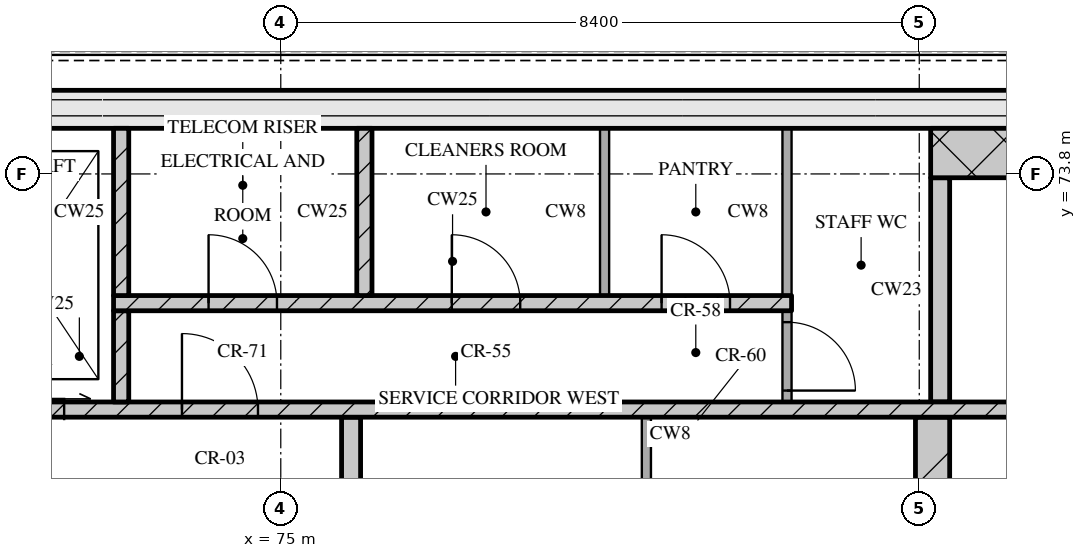
"""IFC4 building model, lengths in metres.
Left out: names, types, materials, properties, quantities, classifications, styles, units other than length and angle.
Written with IfcOpenShell. Run it as: python <this file> out.ifc"""

import sys

from ifc_helpers import new_model, si_unit, direction, frame, frame_2d, origin, place, context, subcontext, project, spatial, rectangle, extrude, element, fill, save


model = new_model("IFC4")
c1 = context("Model", 3, precision=1e-05, world=origin(), true_north=direction((0.0, 1.0)))
c2 = subcontext(c1, "Body", "Model", "MODEL_VIEW")
j1 = project(units=[si_unit("LENGTHUNIT", "METRE"), si_unit("PLANEANGLEUNIT", "RADIAN")], contexts=[c1])
p1 = place(None, origin())
s1 = spatial("IfcSite", under=j1, at=p1, CompositionType="ELEMENT")
p2 = place(p1, origin())
s2 = spatial("IfcBuilding", under=s1, at=p2, CompositionType="ELEMENT")
p3 = place(p2, frame((0.0, 0.0, 267.15)))
s3 = spatial("IfcBuildingStorey", under=s2, at=p3, CompositionType="ELEMENT", Elevation=267.15)
p4 = place(p3, frame((67.3, 74.65, 0.0), z_axis=(0.0, 0.0, 1.0), x_axis=(1.0, 0.0, 0.0)))
e1 = element("IfcWall", 1, at=p4, inside=s3, PredefinedType="SOLIDWALL", context=c2, shape_type="SweptSolid", body=[
    extrude(rectangle(XDim=40.6, YDim=0.5, at=frame_2d((20.3, 0.0))), origin(), (0.0, 0.0, 1.0), 3.32),
])
p5 = place(p3, frame((79.81, 68.0, 0.0), z_axis=(0.0, 0.0, 1.0), x_axis=(0.0, 1.0, 0.0)))
e2 = element("IfcWall", 2, at=p5, inside=s3, PredefinedType="PARTITIONING", context=c2, shape_type="SweptSolid", body=[
    extrude(rectangle(XDim=2.6, YDim=0.12, at=frame_2d((1.3, 0.0))), origin(), (0.0, 0.0, 1.0), 3.32),
])
p6 = place(p3, frame((83.575, 68.0, 0.0), z_axis=(0.0, 0.0, 1.0), x_axis=(0.0, 1.0, 0.0)))
e3 = element("IfcWall", 3, at=p6, inside=s3, PredefinedType="SOLIDWALL", context=c2, shape_type="SweptSolid", body=[
    extrude(rectangle(XDim=2.6, YDim=0.45, at=frame_2d((1.3, 0.0))), origin(), (0.0, 0.0, 1.0), 3.32),
])
p7 = place(p3, frame((75.925, 68.3, 0.0), z_axis=(0.0, 0.0, 1.0), x_axis=(0.0, 1.0, 0.0)))
e4 = element("IfcWall", 4, at=p7, inside=s3, PredefinedType="SOLIDWALL", context=c2, shape_type="SweptSolid", body=[
    extrude(rectangle(XDim=2.3, YDim=0.25, at=frame_2d((1.15, 0.0))), origin(), (0.0, 0.0, 1.0), 3.32),
])
p8 = place(p3, frame((67.8, 70.7, 0.0), z_axis=(0.0, 0.0, 1.0), x_axis=(1.0, 0.0, 0.0)))
e5 = element("IfcWall", 5, at=p8, inside=s3, PredefinedType="SOLIDWALL", context=c2, shape_type="SweptSolid", body=[
    extrude(rectangle(XDim=39.6, YDim=0.2, at=frame_2d((19.8, 0.0))), origin(), (0.0, 0.0, 1.0), 3.32),
])
p9 = place(p8, frame((0.65, 0.0, 0.0)))
e6 = element("IfcOpeningElement", 6, at=p9, cuts=e5, PredefinedType="OPENING", context=c2, shape_type="SweptSolid", body=[
    extrude(rectangle(XDim=1.1, YDim=2.1, at=frame_2d((0.55, 1.05))), frame((0.0, 0.11, 0.0), z_axis=(0.0, -1.0, 0.0), x_axis=(1.0, 0.0, 0.0)), (0.0, 0.0, 1.0), 0.22),
])
p10 = place(p8, frame((3.25, 0.0, 0.0)))
e7 = element("IfcOpeningElement", 7, at=p10, cuts=e5, PredefinedType="OPENING", context=c2, shape_type="SweptSolid", body=[
    extrude(rectangle(XDim=1.1, YDim=2.1, at=frame_2d((0.55, 1.05))), frame((0.0, 0.11, 0.0), z_axis=(0.0, -1.0, 0.0), x_axis=(1.0, 0.0, 0.0)), (0.0, 0.0, 1.0), 0.22),
])
p11 = place(p8, frame((5.9, 0.0, 0.0)))
e8 = element("IfcOpeningElement", 8, at=p11, cuts=e5, PredefinedType="OPENING", context=c2, shape_type="SweptSolid", body=[
    extrude(rectangle(XDim=1.0, YDim=2.1, at=frame_2d((0.5, 1.05))), frame((0.0, 0.11, 0.0), z_axis=(0.0, -1.0, 0.0), x_axis=(1.0, 0.0, 0.0)), (0.0, 0.0, 1.0), 0.22),
])
p12 = place(p8, frame((21.7, 0.0, 0.0)))
e9 = element("IfcOpeningElement", 9, at=p12, cuts=e5, PredefinedType="OPENING", context=c2, shape_type="SweptSolid", body=[
    extrude(rectangle(XDim=1.0, YDim=2.1, at=frame_2d((0.5, 1.05))), frame((0.0, 0.11, 0.0), z_axis=(0.0, -1.0, 0.0), x_axis=(1.0, 0.0, 0.0)), (0.0, 0.0, 1.0), 0.22),
])
p13 = place(p8, frame((32.7, 0.0, 0.0)))
e10 = element("IfcOpeningElement", 10, at=p13, cuts=e5, PredefinedType="OPENING", context=c2, shape_type="SweptSolid", body=[
    extrude(rectangle(XDim=1.0, YDim=2.1, at=frame_2d((0.5, 1.05))), frame((0.0, 0.11, 0.0), z_axis=(0.0, -1.0, 0.0), x_axis=(1.0, 0.0, 0.0)), (0.0, 0.0, 1.0), 0.22),
])
p14 = place(p8, frame((35.25, 0.0, 0.0)))
e11 = element("IfcOpeningElement", 11, at=p14, cuts=e5, PredefinedType="OPENING", context=c2, shape_type="SweptSolid", body=[
    extrude(rectangle(XDim=1.1, YDim=2.1, at=frame_2d((0.55, 1.05))), frame((0.0, 0.11, 0.0), z_axis=(0.0, -1.0, 0.0), x_axis=(1.0, 0.0, 0.0)), (0.0, 0.0, 1.0), 0.22),
])
p15 = place(p8, frame((37.85, 0.0, 0.0)))
e12 = element("IfcOpeningElement", 12, at=p15, cuts=e5, PredefinedType="OPENING", context=c2, shape_type="SweptSolid", body=[
    extrude(rectangle(XDim=1.1, YDim=2.1, at=frame_2d((0.55, 1.05))), frame((0.0, 0.11, 0.0), z_axis=(0.0, -1.0, 0.0), x_axis=(1.0, 0.0, 0.0)), (0.0, 0.0, 1.0), 0.22),
])
p16 = place(p3, frame((72.9, 70.8, 0.0), z_axis=(0.0, 0.0, 1.0), x_axis=(0.0, 1.0, 0.0)))
e13 = element("IfcWall", 13, at=p16, inside=s3, PredefinedType="SOLIDWALL", context=c2, shape_type="SweptSolid", body=[
    extrude(rectangle(XDim=1.2, YDim=0.2, at=frame_2d((0.6, 0.0))), origin(), (0.0, 0.0, 1.0), 3.32),
])
p17 = place(p3, frame((81.66, 70.8, 0.0), z_axis=(0.0, 0.0, 1.0), x_axis=(0.0, 1.0, 0.0)))
e14 = element("IfcWall", 14, at=p17, inside=s3, PredefinedType="PARTITIONING", context=c2, shape_type="SweptSolid", body=[
    extrude(rectangle(XDim=1.2, YDim=0.12, at=frame_2d((0.6, 0.0))), origin(), (0.0, 0.0, 1.0), 3.32),
])
p18 = place(p17, frame((0.15, 0.0, 0.0)))
e15 = element("IfcOpeningElement", 15, at=p18, cuts=e14, PredefinedType="OPENING", context=c2, shape_type="SweptSolid", body=[
    extrude(rectangle(XDim=0.9, YDim=2.1, at=frame_2d((0.45, 1.05))), frame((0.0, 0.07, 0.0), z_axis=(0.0, -1.0, 0.0), x_axis=(1.0, 0.0, 0.0)), (0.0, 0.0, 1.0), 0.14),
])
p19 = place(p3, frame((83.675, 70.8, 0.0), z_axis=(0.0, 0.0, 1.0), x_axis=(0.0, 1.0, 0.0)))
e16 = element("IfcWall", 16, at=p19, inside=s3, PredefinedType="SOLIDWALL", context=c2, shape_type="SweptSolid", body=[
    extrude(rectangle(XDim=2.95, YDim=0.25, at=frame_2d((1.475, 0.0))), origin(), (0.0, 0.0, 1.0), 3.32),
])
p20 = place(p3, frame((72.8, 72.1, 0.0), z_axis=(0.0, 0.0, 1.0), x_axis=(1.0, 0.0, 0.0)))
e17 = element("IfcWall", 17, at=p20, inside=s3, PredefinedType="SOLIDWALL", context=c2, shape_type="SweptSolid", body=[
    extrude(rectangle(XDim=8.92, YDim=0.2, at=frame_2d((4.46, 0.0))), origin(), (0.0, 0.0, 1.0), 3.32),
])
p21 = place(p20, frame((1.25, 0.0, 0.0)))
e18 = element("IfcOpeningElement", 18, at=p21, cuts=e17, PredefinedType="OPENING", context=c2, shape_type="SweptSolid", body=[
    extrude(rectangle(XDim=0.9, YDim=2.1, at=frame_2d((0.45, 1.05))), frame((0.0, 0.11, 0.0), z_axis=(0.0, -1.0, 0.0), x_axis=(1.0, 0.0, 0.0)), (0.0, 0.0, 1.0), 0.22),
])
p22 = place(p20, frame((4.45, 0.0, 0.0)))
e19 = element("IfcOpeningElement", 19, at=p22, cuts=e17, PredefinedType="OPENING", context=c2, shape_type="SweptSolid", body=[
    extrude(rectangle(XDim=0.9, YDim=2.1, at=frame_2d((0.45, 1.05))), frame((0.0, 0.11, 0.0), z_axis=(0.0, -1.0, 0.0), x_axis=(1.0, 0.0, 0.0)), (0.0, 0.0, 1.0), 0.22),
])
p23 = place(p20, frame((7.21, 0.0, 0.0)))
e20 = element("IfcOpeningElement", 20, at=p23, cuts=e17, PredefinedType="OPENING", context=c2, shape_type="SweptSolid", body=[
    extrude(rectangle(XDim=0.9, YDim=2.1, at=frame_2d((0.45, 1.05))), frame((0.0, 0.11, 0.0), z_axis=(0.0, -1.0, 0.0), x_axis=(1.0, 0.0, 0.0)), (0.0, 0.0, 1.0), 0.22),
])
for number, where, z_axis, x_axis in (
    (21, (72.9, 72.2, 0.0), (0.0, 0.0, 1.0), (0.0, 1.0, 0.0)),
    (22, (76.1, 72.2, 0.0), (0.0, 0.0, 1.0), (0.0, 1.0, 0.0)),
):
    element("IfcWall", number, at=place(p3, frame(where, z_axis=z_axis, x_axis=x_axis)), inside=s3, PredefinedType="SOLIDWALL", context=c2, shape_type="SweptSolid", body=[
        extrude(rectangle(XDim=2.2, YDim=0.2, at=frame_2d((1.1, 0.0))), origin(), (0.0, 0.0, 1.0), 3.32),
    ])
for number, where, z_axis, x_axis in (
    (23, (79.26, 72.2, 0.0), (0.0, 0.0, 1.0), (0.0, 1.0, 0.0)),
    (24, (81.66, 72.2, 0.0), (0.0, 0.0, 1.0), (0.0, 1.0, 0.0)),
):
    element("IfcWall", number, at=place(p3, frame(where, z_axis=z_axis, x_axis=x_axis)), inside=s3, PredefinedType="PARTITIONING", context=c2, shape_type="SweptSolid", body=[
        extrude(rectangle(XDim=2.2, YDim=0.12, at=frame_2d((1.1, 0.0))), origin(), (0.0, 0.0, 1.0), 3.32),
    ])
p24 = place(p3, frame((83.55, 74.075, 0.0), z_axis=(0.0, 0.0, 1.0), x_axis=(1.0, 0.0, 0.0)))
e25 = element("IfcWall", 25, at=p24, inside=s3, PredefinedType="SOLIDWALL", context=c2, shape_type="SweptSolid", body=[
    extrude(rectangle(XDim=8.1, YDim=0.65, at=frame_2d((4.05, 0.0))), origin(), (0.0, 0.0, 1.0), 3.32),
])
p25 = place(p10, origin())
e26 = element("IfcDoor", 26, at=p25, inside=s3, OperationType="SLIDING_TO_RIGHT", PredefinedType="DOOR", context=c2, shape_type="SweptSolid", body=[
    extrude(rectangle(XDim=1.1, YDim=2.1, at=frame_2d((0.55, 1.05))), frame((0.0, 0.025, 0.0), z_axis=(0.0, -1.0, 0.0), x_axis=(1.0, 0.0, 0.0)), (0.0, 0.0, 1.0), 0.05),
])
fill(e7, e26)
p26 = place(p11, origin())
e27 = element("IfcDoor", 27, at=p26, inside=s3, OperationType="SINGLE_SWING_LEFT", PredefinedType="DOOR", context=c2, shape_type="SweptSolid", body=[
    extrude(rectangle(XDim=1.0, YDim=2.1, at=frame_2d((0.5, 1.05))), frame((0.0, 0.025, 0.0), z_axis=(0.0, -1.0, 0.0), x_axis=(1.0, 0.0, 0.0)), (0.0, 0.0, 1.0), 0.05),
])
fill(e8, e27)
p27 = place(p18, origin())
e28 = element("IfcDoor", 28, at=p27, inside=s3, OperationType="SINGLE_SWING_RIGHT", PredefinedType="DOOR", context=c2, shape_type="SweptSolid", body=[
    extrude(rectangle(XDim=0.9, YDim=2.1, at=frame_2d((0.45, 1.05))), frame((0.0, 0.025, 0.0), z_axis=(0.0, -1.0, 0.0), x_axis=(1.0, 0.0, 0.0)), (0.0, 0.0, 1.0), 0.05),
])
fill(e15, e28)
p28 = place(p21, origin())
e29 = element("IfcDoor", 29, at=p28, inside=s3, OperationType="SINGLE_SWING_LEFT", PredefinedType="DOOR", context=c2, shape_type="SweptSolid", body=[
    extrude(rectangle(XDim=0.9, YDim=2.1, at=frame_2d((0.45, 1.05))), frame((0.0, 0.025, 0.0), z_axis=(0.0, -1.0, 0.0), x_axis=(1.0, 0.0, 0.0)), (0.0, 0.0, 1.0), 0.05),
])
fill(e18, e29)
p29 = place(p22, origin())
e30 = element("IfcDoor", 30, at=p29, inside=s3, OperationType="SINGLE_SWING_LEFT", PredefinedType="DOOR", context=c2, shape_type="SweptSolid", body=[
    extrude(rectangle(XDim=0.9, YDim=2.1, at=frame_2d((0.45, 1.05))), frame((0.0, 0.025, 0.0), z_axis=(0.0, -1.0, 0.0), x_axis=(1.0, 0.0, 0.0)), (0.0, 0.0, 1.0), 0.05),
])
fill(e19, e30)
p30 = place(p23, origin())
e31 = element("IfcDoor", 31, at=p30, inside=s3, OperationType="SINGLE_SWING_LEFT", PredefinedType="DOOR", context=c2, shape_type="SweptSolid", body=[
    extrude(rectangle(XDim=0.9, YDim=2.1, at=frame_2d((0.45, 1.05))), frame((0.0, 0.025, 0.0), z_axis=(0.0, -1.0, 0.0), x_axis=(1.0, 0.0, 0.0)), (0.0, 0.0, 1.0), 0.05),
])
fill(e20, e31)
save(model, sys.argv[1])
